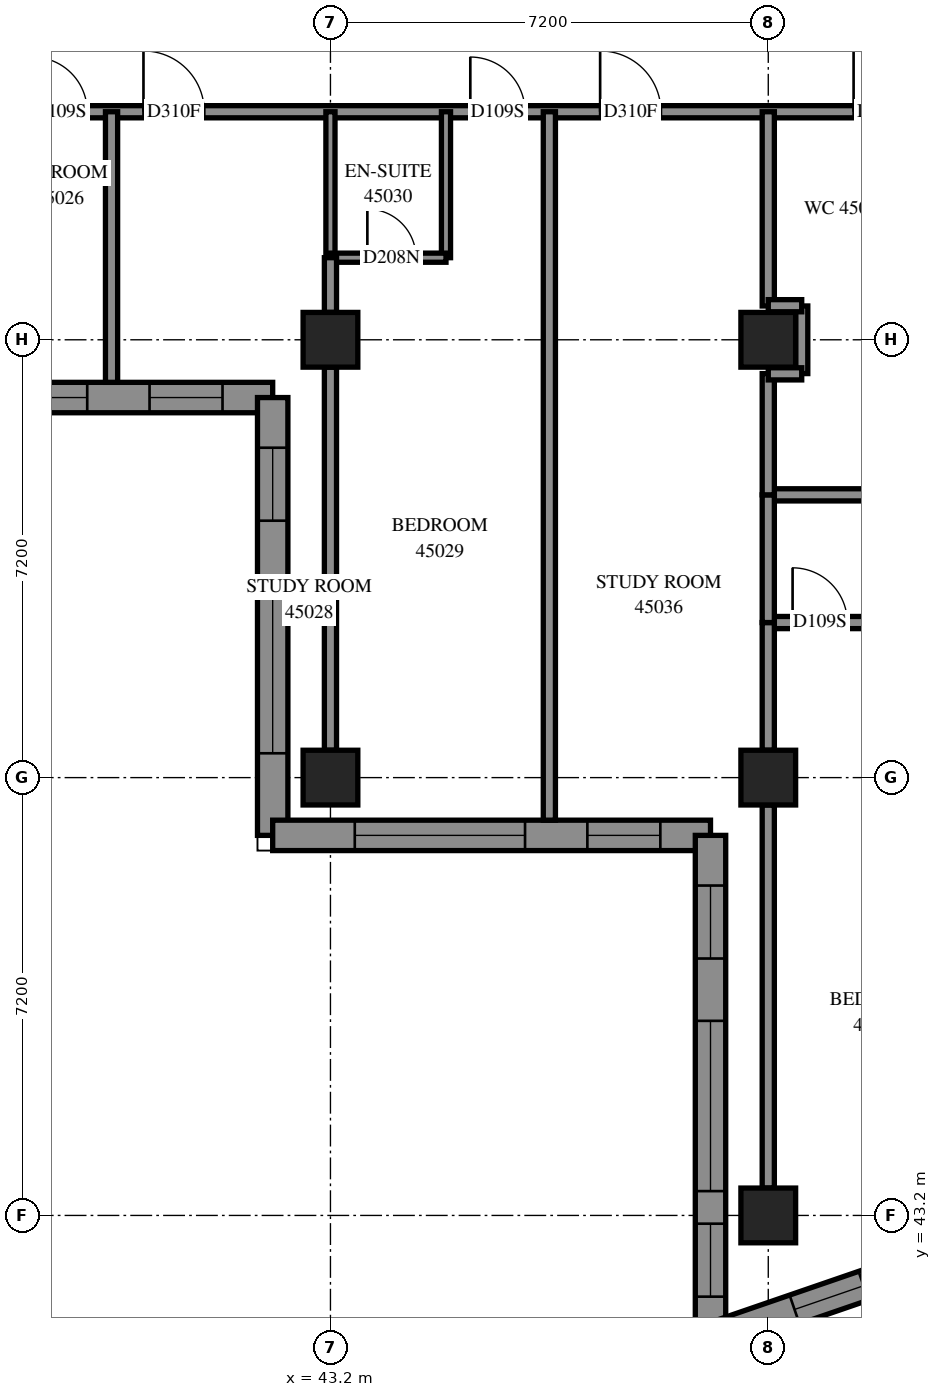
"""IFC4 building model, lengths in metres.
Left out: names, types, materials, properties, quantities, classifications, styles, units other than length and angle.
Written with IfcOpenShell. Run it as: python <this file> out.ifc"""

import sys

from ifc_helpers import new_model, si_unit, direction, frame, frame_2d, origin, origin_2d, place, context, subcontext, project, spatial, polyline, rectangle, outline, extrude, element, fill, save


model = new_model("IFC4")
c1 = context("Model", 3, precision=1e-05, world=origin(), true_north=direction((0.0, 1.0)))
c2 = subcontext(c1, "Body", "Model", "MODEL_VIEW")
j1 = project(units=[si_unit("LENGTHUNIT", "METRE"), si_unit("PLANEANGLEUNIT", "RADIAN")], contexts=[c1])
p1 = place(None, origin())
s1 = spatial("IfcSite", under=j1, at=p1, CompositionType="ELEMENT")
p2 = place(p1, origin())
s2 = spatial("IfcBuilding", under=s1, at=p2, CompositionType="ELEMENT")
p3 = place(p2, frame((0.0, 0.0, 166.0)))
s3 = spatial("IfcBuildingStorey", under=s2, at=p3, CompositionType="ELEMENT", Elevation=166.0)
for number, where, z_axis, x_axis in (
    (1, (43.2, 50.4, 0.0), (0.0, 0.0, 1.0), (1.0, 0.0, 0.0)),
    (2, (43.2, 57.6, 0.0), (0.0, 0.0, 1.0), (1.0, 0.0, 0.0)),
    (3, (50.4, 43.2, 0.0), (0.0, 0.0, 1.0), (1.0, 0.0, 0.0)),
    (4, (50.4, 50.4, 0.0), (0.0, 0.0, 1.0), (1.0, 0.0, 0.0)),
    (5, (50.4, 57.6, 0.0), (0.0, 0.0, 1.0), (1.0, 0.0, 0.0)),
):
    element("IfcColumn", number, at=place(p3, frame(where, z_axis=z_axis, x_axis=x_axis)), inside=s3, PredefinedType="COLUMN", context=c2, shape_type="SweptSolid", body=[
        extrude(rectangle(XDim=0.9, YDim=0.9, at=origin_2d()), origin(), (0.0, 0.0, 1.0), 3.1),
    ])
p4 = place(p3, frame((35.05, 56.65, 0.0), z_axis=(0.0, 0.0, 1.0), x_axis=(1.0, 0.0, 0.0)))
e6 = element("IfcWall", 6, at=p4, inside=s3, PredefinedType="SOLIDWALL", context=c2, shape_type="SweptSolid", body=[
    extrude(outline(polyline([(-0.25, -0.25), (6.95, -0.25), (7.45, 0.25), (0.25, 0.25), (-0.25, -0.25)])), origin(), (0.0, 0.0, 1.0), 3.1),
])
p5 = place(p4, frame((1.35, 0.0, 0.45)))
e7 = element("IfcOpeningElement", 7, at=p5, cuts=e6, PredefinedType="OPENING", context=c2, shape_type="SweptSolid", body=[
    extrude(rectangle(XDim=2.8, YDim=2.5, at=frame_2d((1.4, 1.25))), frame((0.0, 0.26, 0.0), z_axis=(0.0, -1.0, 0.0), x_axis=(1.0, 0.0, 0.0)), (0.0, 0.0, 1.0), 0.52),
])
p6 = place(p4, frame((5.175, 0.0, 0.45)))
e8 = element("IfcOpeningElement", 8, at=p6, cuts=e6, PredefinedType="OPENING", context=c2, shape_type="SweptSolid", body=[
    extrude(rectangle(XDim=1.2, YDim=2.5, at=frame_2d((0.6, 1.25))), frame((0.0, 0.26, 0.0), z_axis=(0.0, -1.0, 0.0), x_axis=(1.0, 0.0, 0.0)), (0.0, 0.0, 1.0), 0.52),
])
p7 = place(p3, frame((42.25, 56.65, 0.0), z_axis=(0.0, 0.0, 1.0), x_axis=(0.0, -1.0, 0.0)))
e9 = element("IfcWall", 9, at=p7, inside=s3, PredefinedType="SOLIDWALL", context=c2, shape_type="SweptSolid", body=[
    extrude(outline(polyline([(0.25, -0.25), (7.45, -0.25), (6.95, 0.25), (-0.25, 0.25), (0.25, -0.25)])), origin(), (0.0, 0.0, 1.0), 3.1),
])
p8 = place(p7, frame((3.05, 0.0, 0.45)))
e10 = element("IfcOpeningElement", 10, at=p8, cuts=e9, PredefinedType="OPENING", context=c2, shape_type="SweptSolid", body=[
    extrude(rectangle(XDim=2.8, YDim=2.5, at=frame_2d((1.4, 1.25))), frame((0.0, 0.26, 0.0), z_axis=(0.0, -1.0, 0.0), x_axis=(1.0, 0.0, 0.0)), (0.0, 0.0, 1.0), 0.52),
])
p9 = place(p7, frame((0.825, 0.0, 0.45)))
e11 = element("IfcOpeningElement", 11, at=p9, cuts=e9, PredefinedType="OPENING", context=c2, shape_type="SweptSolid", body=[
    extrude(rectangle(XDim=1.2, YDim=2.5, at=frame_2d((0.6, 1.25))), frame((0.0, 0.26, 0.0), z_axis=(0.0, -1.0, 0.0), x_axis=(1.0, 0.0, 0.0)), (0.0, 0.0, 1.0), 0.52),
])
p10 = place(p3, frame((42.25, 49.45, 0.0), z_axis=(0.0, 0.0, 1.0), x_axis=(1.0, 0.0, 0.0)))
e12 = element("IfcWall", 12, at=p10, inside=s3, PredefinedType="SOLIDWALL", context=c2, shape_type="SweptSolid", body=[
    extrude(outline(polyline([(-0.25, -0.25), (6.95, -0.25), (7.45, 0.25), (0.25, 0.25), (-0.25, -0.25)])), origin(), (0.0, 0.0, 1.0), 3.1),
])
p11 = place(p10, frame((1.35, 0.0, 0.45)))
e13 = element("IfcOpeningElement", 13, at=p11, cuts=e12, PredefinedType="OPENING", context=c2, shape_type="SweptSolid", body=[
    extrude(rectangle(XDim=2.8, YDim=2.5, at=frame_2d((1.4, 1.25))), frame((0.0, 0.26, 0.0), z_axis=(0.0, -1.0, 0.0), x_axis=(1.0, 0.0, 0.0)), (0.0, 0.0, 1.0), 0.52),
])
p12 = place(p10, frame((5.175, 0.0, 0.45)))
e14 = element("IfcOpeningElement", 14, at=p12, cuts=e12, PredefinedType="OPENING", context=c2, shape_type="SweptSolid", body=[
    extrude(rectangle(XDim=1.2, YDim=2.5, at=frame_2d((0.6, 1.25))), frame((0.0, 0.26, 0.0), z_axis=(0.0, -1.0, 0.0), x_axis=(1.0, 0.0, 0.0)), (0.0, 0.0, 1.0), 0.52),
])
p13 = place(p3, frame((49.45, 49.45, 0.0), z_axis=(0.0, 0.0, 1.0), x_axis=(0.0, -1.0, 0.0)))
e15 = element("IfcWall", 15, at=p13, inside=s3, PredefinedType="SOLIDWALL", context=c2, shape_type="SweptSolid", body=[
    extrude(outline(polyline([(0.25, -0.25), (8.622, -0.25), (7.921, 0.25), (-0.25, 0.25), (0.25, -0.25)])), origin(), (0.0, 0.0, 1.0), 3.1),
])
p14 = place(p13, frame((3.05, 0.0, 0.45)))
e16 = element("IfcOpeningElement", 16, at=p14, cuts=e15, PredefinedType="OPENING", context=c2, shape_type="SweptSolid", body=[
    extrude(rectangle(XDim=2.8, YDim=2.5, at=frame_2d((1.4, 1.25))), frame((0.0, 0.26, 0.0), z_axis=(0.0, -1.0, 0.0), x_axis=(1.0, 0.0, 0.0)), (0.0, 0.0, 1.0), 0.52),
])
p15 = place(p13, frame((0.825, 0.0, 0.45)))
e17 = element("IfcOpeningElement", 17, at=p15, cuts=e15, PredefinedType="OPENING", context=c2, shape_type="SweptSolid", body=[
    extrude(rectangle(XDim=1.2, YDim=2.5, at=frame_2d((0.6, 1.25))), frame((0.0, 0.26, 0.0), z_axis=(0.0, -1.0, 0.0), x_axis=(1.0, 0.0, 0.0)), (0.0, 0.0, 1.0), 0.52),
])
p16 = place(p13, frame((6.386, 0.0, 0.45)))
e18 = element("IfcOpeningElement", 18, at=p16, cuts=e15, PredefinedType="OPENING", context=c2, shape_type="SweptSolid", body=[
    extrude(rectangle(XDim=1.2, YDim=2.5, at=frame_2d((0.6, 1.25))), frame((0.0, 0.26, 0.0), z_axis=(0.0, -1.0, 0.0), x_axis=(1.0, 0.0, 0.0)), (0.0, 0.0, 1.0), 0.52),
])
p17 = place(p3, frame((49.45, 41.178, 0.0), z_axis=(0.0, 0.0, 1.0), x_axis=(0.9456634328, 0.3251471543, 0.0)))
e19 = element("IfcWall", 19, at=p17, inside=s3, PredefinedType="SOLIDWALL", context=c2, shape_type="SweptSolid", body=[
    extrude(outline(polyline([(-0.35, -0.25), (3.254, -0.25), (3.381, 0.25), (0.35, 0.25), (-0.35, -0.25)])), origin(), (0.0, 0.0, 1.0), 3.1),
])
p18 = place(p17, frame((1.461, 0.0, 0.45)))
e20 = element("IfcOpeningElement", 20, at=p18, cuts=e19, PredefinedType="OPENING", context=c2, shape_type="SweptSolid", body=[
    extrude(rectangle(XDim=1.2, YDim=2.5, at=frame_2d((0.6, 1.25))), frame((0.0, 0.26, 0.0), z_axis=(0.0, -1.0, 0.0), x_axis=(1.0, 0.0, 0.0)), (0.0, 0.0, 1.0), 0.52),
])
p19 = place(p3, frame((36.0, 61.35, 0.0), z_axis=(0.0, 0.0, 1.0), x_axis=(1.0, 0.0, 0.0)))
e21 = element("IfcWall", 21, at=p19, inside=s3, PredefinedType="PARTITIONING", context=c2, shape_type="SweptSolid", body=[
    extrude(rectangle(XDim=16.95, YDim=0.2, at=frame_2d((8.475, 0.0))), origin(), (0.0, 0.0, 1.0), 3.1),
])
p20 = place(p19, frame((2.3, 0.0, 0.0)))
e22 = element("IfcOpeningElement", 22, at=p20, cuts=e21, PredefinedType="OPENING", context=c2, shape_type="SweptSolid", body=[
    extrude(rectangle(XDim=0.9, YDim=2.1, at=frame_2d((0.45, 1.05))), frame((0.0, 0.11, 0.0), z_axis=(0.0, -1.0, 0.0), x_axis=(1.0, 0.0, 0.0)), (0.0, 0.0, 1.0), 0.22),
])
p21 = place(p19, frame((4.125, 0.0, 0.0)))
e23 = element("IfcOpeningElement", 23, at=p21, cuts=e21, PredefinedType="OPENING", context=c2, shape_type="SweptSolid", body=[
    extrude(rectangle(XDim=1.0, YDim=2.1, at=frame_2d((0.5, 1.05))), frame((0.0, 0.11, 0.0), z_axis=(0.0, -1.0, 0.0), x_axis=(1.0, 0.0, 0.0)), (0.0, 0.0, 1.0), 0.22),
])
p22 = place(p19, frame((9.5, 0.0, 0.0)))
e24 = element("IfcOpeningElement", 24, at=p22, cuts=e21, PredefinedType="OPENING", context=c2, shape_type="SweptSolid", body=[
    extrude(rectangle(XDim=0.9, YDim=2.1, at=frame_2d((0.45, 1.05))), frame((0.0, 0.11, 0.0), z_axis=(0.0, -1.0, 0.0), x_axis=(1.0, 0.0, 0.0)), (0.0, 0.0, 1.0), 0.22),
])
p23 = place(p19, frame((11.635, 0.0, 0.0)))
e25 = element("IfcOpeningElement", 25, at=p23, cuts=e21, PredefinedType="OPENING", context=c2, shape_type="SweptSolid", body=[
    extrude(rectangle(XDim=1.0, YDim=2.1, at=frame_2d((0.5, 1.05))), frame((0.0, 0.11, 0.0), z_axis=(0.0, -1.0, 0.0), x_axis=(1.0, 0.0, 0.0)), (0.0, 0.0, 1.0), 0.22),
])
p24 = place(p19, frame((15.803, 0.0, 0.0)))
e26 = element("IfcOpeningElement", 26, at=p24, cuts=e21, PredefinedType="OPENING", context=c2, shape_type="SweptSolid", body=[
    extrude(rectangle(XDim=1.0, YDim=2.1, at=frame_2d((0.5, 1.05))), frame((0.0, 0.11, 0.0), z_axis=(0.0, -1.0, 0.0), x_axis=(1.0, 0.0, 0.0)), (0.0, 0.0, 1.0), 0.22),
])
p25 = place(p3, frame((46.8, 49.7, 0.0), z_axis=(0.0, 0.0, 1.0), x_axis=(0.0, 1.0, 0.0)))
e27 = element("IfcWall", 27, at=p25, inside=s3, PredefinedType="PARTITIONING", context=c2, shape_type="SweptSolid", body=[
    extrude(rectangle(XDim=11.65, YDim=0.2, at=frame_2d((5.825, 0.0))), origin(), (0.0, 0.0, 1.0), 3.1),
])
for number, where, z_axis, x_axis in (
    (28, (50.4, 43.65, 0.0), (0.0, 0.0, 1.0), (0.0, 1.0, 0.0)),
    (29, (43.2, 50.85, 0.0), (0.0, 0.0, 1.0), (0.0, 1.0, 0.0)),
):
    element("IfcWall", number, at=place(p3, frame(where, z_axis=z_axis, x_axis=x_axis)), inside=s3, PredefinedType="PARTITIONING", context=c2, shape_type="SweptSolid", body=[
        extrude(rectangle(XDim=6.3, YDim=0.2, at=frame_2d((3.15, 0.0))), origin(), (0.0, 0.0, 1.0), 2.6),
    ])
p26 = place(p3, frame((50.4, 52.95, 0.0), z_axis=(0.0, 0.0, 1.0), x_axis=(1.0, 0.0, 0.0)))
e30 = element("IfcWall", 30, at=p26, inside=s3, PredefinedType="PARTITIONING", context=c2, shape_type="SweptSolid", body=[
    extrude(rectangle(XDim=5.1, YDim=0.2, at=frame_2d((2.55, 0.0))), origin(), (0.0, 0.0, 1.0), 3.1),
])
p27 = place(p26, frame((0.4, 0.0, 0.0)))
e31 = element("IfcOpeningElement", 31, at=p27, cuts=e30, PredefinedType="OPENING", context=c2, shape_type="SweptSolid", body=[
    extrude(rectangle(XDim=0.9, YDim=2.1, at=frame_2d((0.45, 1.05))), frame((0.0, 0.11, 0.0), z_axis=(0.0, -1.0, 0.0), x_axis=(1.0, 0.0, 0.0)), (0.0, 0.0, 1.0), 0.22),
])
p28 = place(p26, frame((3.976, 0.0, 0.0)))
e32 = element("IfcOpeningElement", 32, at=p28, cuts=e30, PredefinedType="OPENING", context=c2, shape_type="SweptSolid", body=[
    extrude(rectangle(XDim=1.0, YDim=2.1, at=frame_2d((0.5, 1.05))), frame((0.0, 0.11, 0.0), z_axis=(0.0, -1.0, 0.0), x_axis=(1.0, 0.0, 0.0)), (0.0, 0.0, 1.0), 0.22),
])
p29 = place(p3, frame((39.6, 56.9, 0.0), z_axis=(0.0, 0.0, 1.0), x_axis=(0.0, 1.0, 0.0)))
e33 = element("IfcWall", 33, at=p29, inside=s3, PredefinedType="PARTITIONING", context=c2, shape_type="SweptSolid", body=[
    extrude(rectangle(XDim=4.45, YDim=0.2, at=frame_2d((2.225, 0.0))), origin(), (0.0, 0.0, 1.0), 3.1),
])
p30 = place(p3, frame((50.4, 58.156, 0.0), z_axis=(0.0, 0.0, 1.0), x_axis=(0.0, 1.0, 0.0)))
e34 = element("IfcWall", 34, at=p30, inside=s3, PredefinedType="PARTITIONING", context=c2, shape_type="SweptSolid", body=[
    extrude(rectangle(XDim=3.194, YDim=0.2, at=frame_2d((1.597, 0.0))), origin(), (0.0, 0.0, 1.0), 3.1),
])
p31 = place(p3, frame((50.4, 55.05, 0.0), z_axis=(0.0, 0.0, 1.0), x_axis=(1.0, 0.0, 0.0)))
e35 = element("IfcWall", 35, at=p31, inside=s3, PredefinedType="PARTITIONING", context=c2, shape_type="SweptSolid", body=[
    extrude(rectangle(XDim=2.55, YDim=0.2, at=frame_2d((1.275, 0.0))), origin(), (0.0, 0.0, 1.0), 3.1),
])
for number, where, z_axis, x_axis in (
    (36, (45.1, 58.95, 0.0), (0.0, 0.0, 1.0), (0.0, 1.0, 0.0)),
    (37, (43.2, 58.95, 0.0), (0.0, 0.0, 1.0), (0.0, 1.0, 0.0)),
):
    element("IfcWall", number, at=place(p3, frame(where, z_axis=z_axis, x_axis=x_axis)), inside=s3, PredefinedType="PARTITIONING", context=c2, shape_type="SweptSolid", body=[
        extrude(rectangle(XDim=2.4, YDim=0.15, at=frame_2d((1.2, 0.0))), origin(), (0.0, 0.0, 1.0), 3.1),
    ])
for number, where, z_axis, x_axis in (
    (38, (50.4, 50.85, 0.0), (0.0, 0.0, 1.0), (0.0, 1.0, 0.0)),
    (39, (50.4, 52.95, 0.0), (0.0, 0.0, 1.0), (0.0, 1.0, 0.0)),
):
    element("IfcWall", number, at=place(p3, frame(where, z_axis=z_axis, x_axis=x_axis)), inside=s3, PredefinedType="PARTITIONING", context=c2, shape_type="SweptSolid", body=[
        extrude(rectangle(XDim=2.1, YDim=0.2, at=frame_2d((1.05, 0.0))), origin(), (0.0, 0.0, 1.0), 3.1),
    ])
p32 = place(p3, frame((50.4, 55.05, 0.0), z_axis=(0.0, 0.0, 1.0), x_axis=(0.0, 1.0, 0.0)))
e40 = element("IfcWall", 40, at=p32, inside=s3, PredefinedType="PARTITIONING", context=c2, shape_type="SweptSolid", body=[
    extrude(rectangle(XDim=1.994, YDim=0.2, at=frame_2d((0.997, 0.0))), origin(), (0.0, 0.0, 1.0), 3.1),
])
p33 = place(p3, frame((43.2, 58.95, 0.0), z_axis=(0.0, 0.0, 1.0), x_axis=(1.0, 0.0, 0.0)))
e41 = element("IfcWall", 41, at=p33, inside=s3, PredefinedType="PARTITIONING", context=c2, shape_type="SweptSolid", body=[
    extrude(rectangle(XDim=1.9, YDim=0.15, at=frame_2d((0.95, 0.0))), origin(), (0.0, 0.0, 1.0), 3.1),
])
p34 = place(p33, frame((0.607, 0.0, 0.0)))
e42 = element("IfcOpeningElement", 42, at=p34, cuts=e41, PredefinedType="OPENING", context=c2, shape_type="SweptSolid", body=[
    extrude(rectangle(XDim=0.8, YDim=2.1, at=frame_2d((0.4, 1.05))), frame((0.0, 0.085, 0.0), z_axis=(0.0, -1.0, 0.0), x_axis=(1.0, 0.0, 0.0)), (0.0, 0.0, 1.0), 0.17),
])
p35 = place(p3, frame((50.95, 57.044, 0.0), z_axis=(0.0, 0.0, 1.0), x_axis=(0.0, 1.0, 0.0)))
e43 = element("IfcWall", 43, at=p35, inside=s3, PredefinedType="PARTITIONING", context=c2, shape_type="SweptSolid", body=[
    extrude(rectangle(XDim=1.112, YDim=0.2, at=frame_2d((0.556, 0.0))), origin(), (0.0, 0.0, 1.0), 3.1),
])
p36 = place(p3, frame((43.2, 58.05, 0.0), z_axis=(0.0, 0.0, 1.0), x_axis=(0.0, 1.0, 0.0)))
e44 = element("IfcWall", 44, at=p36, inside=s3, PredefinedType="PARTITIONING", context=c2, shape_type="SweptSolid", body=[
    extrude(rectangle(XDim=0.9, YDim=0.2, at=frame_2d((0.45, 0.0))), origin(), (0.0, 0.0, 1.0), 3.1),
])
for number, where, z_axis, x_axis in (
    (45, (50.4, 58.16, 0.0), (0.0, 0.0, 1.0), (1.0, 0.0, 0.0)),
    (46, (50.4, 57.04, 0.0), (0.0, 0.0, 1.0), (1.0, 0.0, 0.0)),
):
    element("IfcWall", number, at=place(p3, frame(where, z_axis=z_axis, x_axis=x_axis)), inside=s3, PredefinedType="PARTITIONING", context=c2, shape_type="SweptSolid", body=[
        extrude(rectangle(XDim=0.55, YDim=0.2, at=frame_2d((0.275, 0.0))), origin(), (0.0, 0.0, 1.0), 3.1),
    ])
p37 = place(p5, origin())
e47 = element("IfcWindow", 47, at=p37, inside=s3, PartitioningType="SINGLE_PANEL", PredefinedType="WINDOW", context=c2, shape_type="SweptSolid", body=[
    extrude(rectangle(XDim=2.8, YDim=2.5, at=frame_2d((1.4, 1.25))), frame((0.0, 0.18, 0.0), z_axis=(0.0, -1.0, 0.0), x_axis=(1.0, 0.0, 0.0)), (0.0, 0.0, 1.0), 0.06),
])
fill(e7, e47)
p38 = place(p6, origin())
e48 = element("IfcWindow", 48, at=p38, inside=s3, PartitioningType="SINGLE_PANEL", PredefinedType="WINDOW", context=c2, shape_type="SweptSolid", body=[
    extrude(rectangle(XDim=1.2, YDim=2.5, at=frame_2d((0.6, 1.25))), frame((0.0, 0.18, 0.0), z_axis=(0.0, -1.0, 0.0), x_axis=(1.0, 0.0, 0.0)), (0.0, 0.0, 1.0), 0.06),
])
fill(e8, e48)
p39 = place(p8, origin())
e49 = element("IfcWindow", 49, at=p39, inside=s3, PartitioningType="SINGLE_PANEL", PredefinedType="WINDOW", context=c2, shape_type="SweptSolid", body=[
    extrude(rectangle(XDim=2.8, YDim=2.5, at=frame_2d((1.4, 1.25))), frame((0.0, 0.18, 0.0), z_axis=(0.0, -1.0, 0.0), x_axis=(1.0, 0.0, 0.0)), (0.0, 0.0, 1.0), 0.06),
])
fill(e10, e49)
p40 = place(p9, origin())
e50 = element("IfcWindow", 50, at=p40, inside=s3, PartitioningType="SINGLE_PANEL", PredefinedType="WINDOW", context=c2, shape_type="SweptSolid", body=[
    extrude(rectangle(XDim=1.2, YDim=2.5, at=frame_2d((0.6, 1.25))), frame((0.0, 0.18, 0.0), z_axis=(0.0, -1.0, 0.0), x_axis=(1.0, 0.0, 0.0)), (0.0, 0.0, 1.0), 0.06),
])
fill(e11, e50)
p41 = place(p11, origin())
e51 = element("IfcWindow", 51, at=p41, inside=s3, PartitioningType="SINGLE_PANEL", PredefinedType="WINDOW", context=c2, shape_type="SweptSolid", body=[
    extrude(rectangle(XDim=2.8, YDim=2.5, at=frame_2d((1.4, 1.25))), frame((0.0, 0.18, 0.0), z_axis=(0.0, -1.0, 0.0), x_axis=(1.0, 0.0, 0.0)), (0.0, 0.0, 1.0), 0.06),
])
fill(e13, e51)
p42 = place(p12, origin())
e52 = element("IfcWindow", 52, at=p42, inside=s3, PartitioningType="SINGLE_PANEL", PredefinedType="WINDOW", context=c2, shape_type="SweptSolid", body=[
    extrude(rectangle(XDim=1.2, YDim=2.5, at=frame_2d((0.6, 1.25))), frame((0.0, 0.18, 0.0), z_axis=(0.0, -1.0, 0.0), x_axis=(1.0, 0.0, 0.0)), (0.0, 0.0, 1.0), 0.06),
])
fill(e14, e52)
p43 = place(p14, origin())
e53 = element("IfcWindow", 53, at=p43, inside=s3, PartitioningType="SINGLE_PANEL", PredefinedType="WINDOW", context=c2, shape_type="SweptSolid", body=[
    extrude(rectangle(XDim=2.8, YDim=2.5, at=frame_2d((1.4, 1.25))), frame((0.0, 0.18, 0.0), z_axis=(0.0, -1.0, 0.0), x_axis=(1.0, 0.0, 0.0)), (0.0, 0.0, 1.0), 0.06),
])
fill(e16, e53)
p44 = place(p15, origin())
e54 = element("IfcWindow", 54, at=p44, inside=s3, PartitioningType="SINGLE_PANEL", PredefinedType="WINDOW", context=c2, shape_type="SweptSolid", body=[
    extrude(rectangle(XDim=1.2, YDim=2.5, at=frame_2d((0.6, 1.25))), frame((0.0, 0.18, 0.0), z_axis=(0.0, -1.0, 0.0), x_axis=(1.0, 0.0, 0.0)), (0.0, 0.0, 1.0), 0.06),
])
fill(e17, e54)
p45 = place(p16, origin())
e55 = element("IfcWindow", 55, at=p45, inside=s3, PartitioningType="SINGLE_PANEL", PredefinedType="WINDOW", context=c2, shape_type="SweptSolid", body=[
    extrude(rectangle(XDim=1.2, YDim=2.5, at=frame_2d((0.6, 1.25))), frame((0.0, 0.18, 0.0), z_axis=(0.0, -1.0, 0.0), x_axis=(1.0, 0.0, 0.0)), (0.0, 0.0, 1.0), 0.06),
])
fill(e18, e55)
p46 = place(p18, origin())
e56 = element("IfcWindow", 56, at=p46, inside=s3, PartitioningType="SINGLE_PANEL", PredefinedType="WINDOW", context=c2, shape_type="SweptSolid", body=[
    extrude(rectangle(XDim=1.2, YDim=2.5, at=frame_2d((0.6, 1.25))), frame((0.0, 0.18, 0.0), z_axis=(0.0, -1.0, 0.0), x_axis=(1.0, 0.0, 0.0)), (0.0, 0.0, 1.0), 0.06),
])
fill(e20, e56)
p47 = place(p20, origin())
e57 = element("IfcDoor", 57, at=p47, inside=s3, OperationType="SINGLE_SWING_LEFT", PredefinedType="DOOR", context=c2, shape_type="SweptSolid", body=[
    extrude(rectangle(XDim=0.9, YDim=2.1, at=frame_2d((0.45, 1.05))), frame((0.0, 0.025, 0.0), z_axis=(0.0, -1.0, 0.0), x_axis=(1.0, 0.0, 0.0)), (0.0, 0.0, 1.0), 0.05),
])
fill(e22, e57)
p48 = place(p21, origin())
e58 = element("IfcDoor", 58, at=p48, inside=s3, OperationType="SINGLE_SWING_RIGHT", PredefinedType="DOOR", context=c2, shape_type="SweptSolid", body=[
    extrude(rectangle(XDim=1.0, YDim=2.1, at=frame_2d((0.5, 1.05))), frame((0.0, 0.025, 0.0), z_axis=(0.0, -1.0, 0.0), x_axis=(1.0, 0.0, 0.0)), (0.0, 0.0, 1.0), 0.05),
])
fill(e23, e58)
p49 = place(p22, origin())
e59 = element("IfcDoor", 59, at=p49, inside=s3, OperationType="SINGLE_SWING_LEFT", PredefinedType="DOOR", context=c2, shape_type="SweptSolid", body=[
    extrude(rectangle(XDim=0.9, YDim=2.1, at=frame_2d((0.45, 1.05))), frame((0.0, 0.025, 0.0), z_axis=(0.0, -1.0, 0.0), x_axis=(1.0, 0.0, 0.0)), (0.0, 0.0, 1.0), 0.05),
])
fill(e24, e59)
p50 = place(p34, origin())
e60 = element("IfcDoor", 60, at=p50, inside=s3, OperationType="SINGLE_SWING_RIGHT", PredefinedType="DOOR", context=c2, shape_type="SweptSolid", body=[
    extrude(rectangle(XDim=0.8, YDim=2.1, at=frame_2d((0.4, 1.05))), frame((0.0, 0.025, 0.0), z_axis=(0.0, -1.0, 0.0), x_axis=(1.0, 0.0, 0.0)), (0.0, 0.0, 1.0), 0.05),
])
fill(e42, e60)
p51 = place(p23, origin())
e61 = element("IfcDoor", 61, at=p51, inside=s3, OperationType="SINGLE_SWING_RIGHT", PredefinedType="DOOR", context=c2, shape_type="SweptSolid", body=[
    extrude(rectangle(XDim=1.0, YDim=2.1, at=frame_2d((0.5, 1.05))), frame((0.0, 0.025, 0.0), z_axis=(0.0, -1.0, 0.0), x_axis=(1.0, 0.0, 0.0)), (0.0, 0.0, 1.0), 0.05),
])
fill(e25, e61)
p52 = place(p24, origin())
e62 = element("IfcDoor", 62, at=p52, inside=s3, OperationType="SINGLE_SWING_LEFT", PredefinedType="DOOR", context=c2, shape_type="SweptSolid", body=[
    extrude(rectangle(XDim=1.0, YDim=2.1, at=frame_2d((0.5, 1.05))), frame((0.0, 0.025, 0.0), z_axis=(0.0, -1.0, 0.0), x_axis=(1.0, 0.0, 0.0)), (0.0, 0.0, 1.0), 0.05),
])
fill(e26, e62)
p53 = place(p27, origin())
e63 = element("IfcDoor", 63, at=p53, inside=s3, OperationType="SINGLE_SWING_LEFT", PredefinedType="DOOR", context=c2, shape_type="SweptSolid", body=[
    extrude(rectangle(XDim=0.9, YDim=2.1, at=frame_2d((0.45, 1.05))), frame((0.0, 0.025, 0.0), z_axis=(0.0, -1.0, 0.0), x_axis=(1.0, 0.0, 0.0)), (0.0, 0.0, 1.0), 0.05),
])
fill(e31, e63)
save(model, sys.argv[1])
